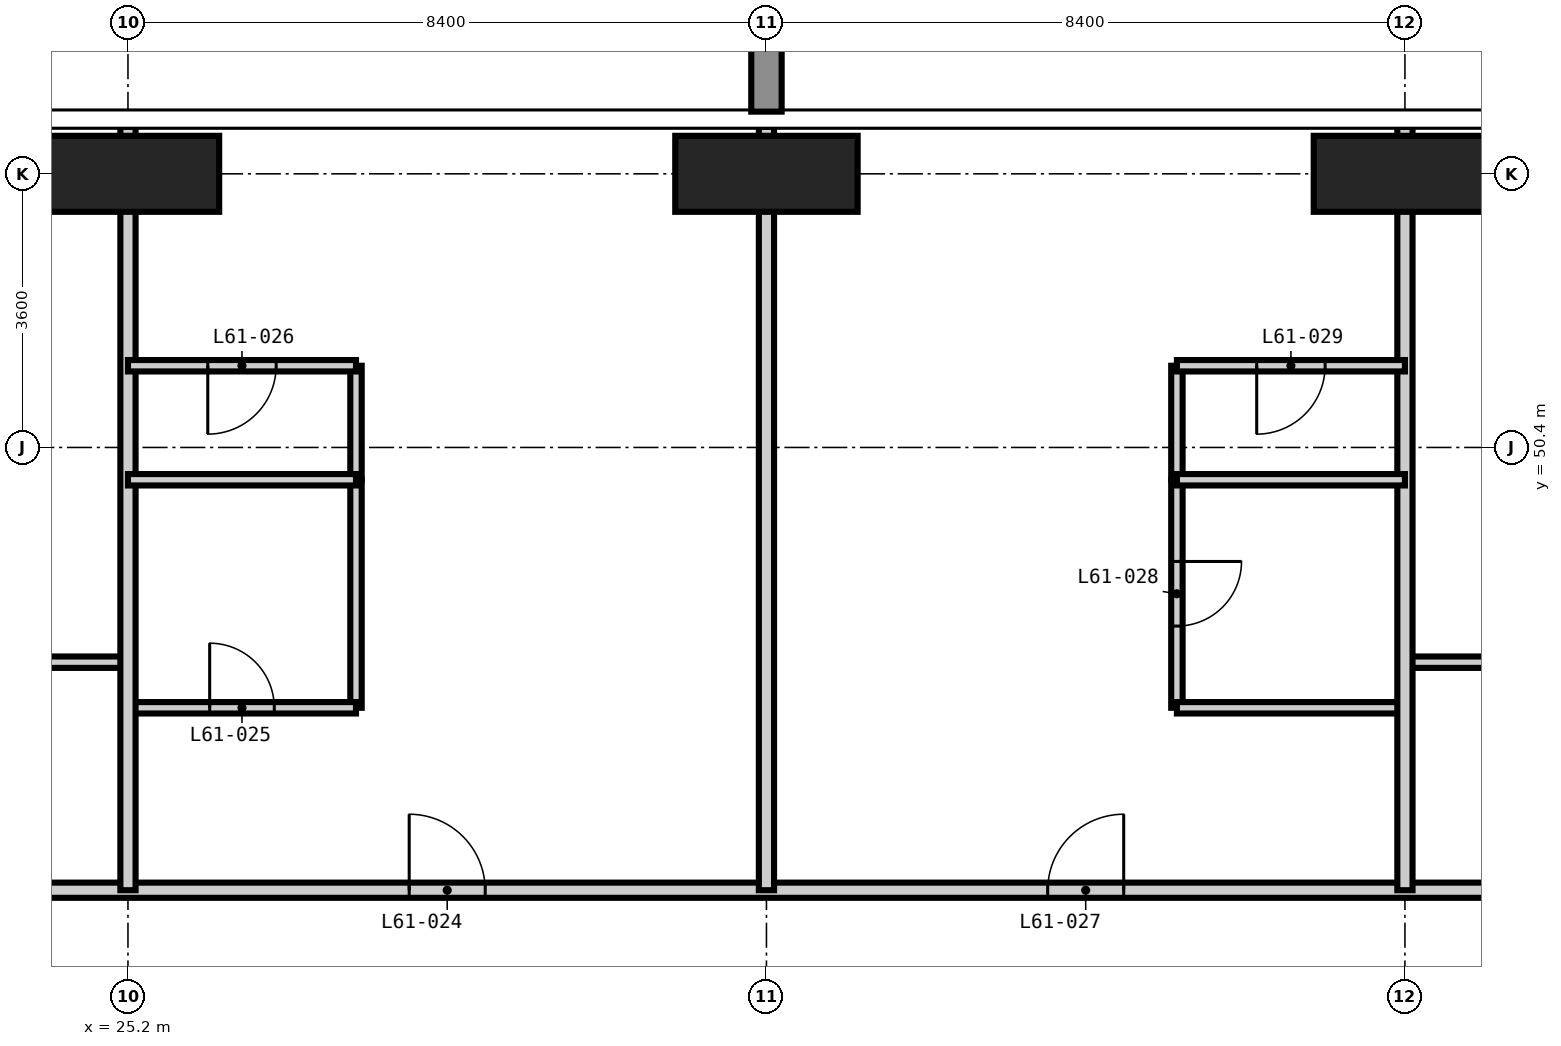
"""IFC4 building model, lengths in metres.
Left out: names, types, materials, properties, quantities, classifications, styles, units other than length and angle.
Written with IfcOpenShell. Run it as: python <this file> out.ifc"""

import sys

from ifc_helpers import new_model, si_unit, direction, frame, frame_2d, origin, origin_2d, place, context, subcontext, project, spatial, rectangle, extrude, element, fill, save


model = new_model("IFC4")
c1 = context("Model", 3, precision=1e-05, world=origin(), true_north=direction((0.0, 1.0)))
c2 = subcontext(c1, "Body", "Model", "MODEL_VIEW")
j1 = project(units=[si_unit("LENGTHUNIT", "METRE"), si_unit("PLANEANGLEUNIT", "RADIAN")], contexts=[c1])
p1 = place(None, origin())
s1 = spatial("IfcSite", under=j1, at=p1, CompositionType="ELEMENT")
p2 = place(p1, origin())
s2 = spatial("IfcBuilding", under=s1, at=p2, CompositionType="ELEMENT")
p3 = place(p2, frame((0.0, 0.0, 237.3)))
s3 = spatial("IfcBuildingStorey", under=s2, at=p3, CompositionType="ELEMENT", Elevation=237.3)
for number, where, z_axis, x_axis in (
    (1, (25.2, 54.0, -0.35), (0.0, 0.0, 1.0), (1.0, 0.0, 0.0)),
    (2, (33.6, 54.0, -0.35), (0.0, 0.0, 1.0), (1.0, 0.0, 0.0)),
    (3, (42.0, 54.0, -0.35), (0.0, 0.0, 1.0), (1.0, 0.0, 0.0)),
):
    element("IfcColumn", number, at=place(p3, frame(where, z_axis=z_axis, x_axis=x_axis)), inside=s3, PredefinedType="COLUMN", context=c2, shape_type="SweptSolid", body=[
        extrude(rectangle(XDim=2.4, YDim=1.0, at=origin_2d()), origin(), (0.0, 0.0, 1.0), 3.9),
    ])
p4 = place(p3, frame((28.2, 46.975, 0.0), z_axis=(0.0, 0.0, 1.0), x_axis=(0.0, 1.0, 0.0)))
e4 = element("IfcWall", 4, at=p4, inside=s3, PredefinedType="PARTITIONING", context=c2, shape_type="SweptSolid", body=[
    extrude(rectangle(XDim=3.0, YDim=0.15, at=frame_2d((1.5, 0.0))), origin(), (0.0, 0.0, 1.0), 3.55),
])
p5 = place(p3, frame((39.0, 46.975, 0.0), z_axis=(0.0, 0.0, 1.0), x_axis=(0.0, 1.0, 0.0)))
e5 = element("IfcWall", 5, at=p5, inside=s3, PredefinedType="PARTITIONING", context=c2, shape_type="SweptSolid", body=[
    extrude(rectangle(XDim=3.0, YDim=0.15, at=frame_2d((1.5, 0.0))), origin(), (0.0, 0.0, 1.0), 3.55),
])
p6 = place(p5, frame((1.075, 0.0, 0.0)))
e6 = element("IfcOpeningElement", 6, at=p6, cuts=e5, PredefinedType="OPENING", context=c2, shape_type="SweptSolid", body=[
    extrude(rectangle(XDim=0.85, YDim=2.1, at=frame_2d((0.425, 1.05))), frame((0.0, 0.085, 0.0), z_axis=(0.0, -1.0, 0.0), x_axis=(1.0, 0.0, 0.0)), (0.0, 0.0, 1.0), 0.17),
])
p7 = place(p3, frame((25.2, 46.975, 0.0), z_axis=(0.0, 0.0, 1.0), x_axis=(1.0, 0.0, 0.0)))
e7 = element("IfcWall", 7, at=p7, inside=s3, PredefinedType="PARTITIONING", context=c2, shape_type="SweptSolid", body=[
    extrude(rectangle(XDim=3.0, YDim=0.15, at=frame_2d((1.5, 0.0))), origin(), (0.0, 0.0, 1.0), 3.55),
])
p8 = place(p7, frame((1.075, 0.0, 0.0)))
e8 = element("IfcOpeningElement", 8, at=p8, cuts=e7, PredefinedType="OPENING", context=c2, shape_type="SweptSolid", body=[
    extrude(rectangle(XDim=0.85, YDim=2.1, at=frame_2d((0.425, 1.05))), frame((0.0, 0.085, 0.0), z_axis=(0.0, -1.0, 0.0), x_axis=(1.0, 0.0, 0.0)), (0.0, 0.0, 1.0), 0.17),
])
p9 = place(p3, frame((39.0, 46.975, 0.0), z_axis=(0.0, 0.0, 1.0), x_axis=(1.0, 0.0, 0.0)))
e9 = element("IfcWall", 9, at=p9, inside=s3, PredefinedType="PARTITIONING", context=c2, shape_type="SweptSolid", body=[
    extrude(rectangle(XDim=3.0, YDim=0.15, at=frame_2d((1.5, 0.0))), origin(), (0.0, 0.0, 1.0), 3.55),
])
p10 = place(p3, frame((22.325, 47.575, 0.0), z_axis=(0.0, 0.0, 1.0), x_axis=(1.0, 0.0, 0.0)))
e10 = element("IfcWall", 10, at=p10, inside=s3, PredefinedType="PARTITIONING", context=c2, shape_type="SweptSolid", body=[
    extrude(rectangle(XDim=2.875, YDim=0.15, at=frame_2d((1.438, 0.0))), origin(), (0.0, 0.0, 1.0), 3.55),
])
p11 = place(p3, frame((42.0, 47.575, 0.0), z_axis=(0.0, 0.0, 1.0), x_axis=(1.0, 0.0, 0.0)))
e11 = element("IfcWall", 11, at=p11, inside=s3, PredefinedType="PARTITIONING", context=c2, shape_type="SweptSolid", body=[
    extrude(rectangle(XDim=3.175, YDim=0.15, at=frame_2d((1.587, 0.0))), origin(), (0.0, 0.0, 1.0), 3.55),
])
p12 = place(p11, frame((1.163, 0.0, 0.0)))
e12 = element("IfcOpeningElement", 12, at=p12, cuts=e11, PredefinedType="OPENING", context=c2, shape_type="SweptSolid", body=[
    extrude(rectangle(XDim=0.85, YDim=2.1, at=frame_2d((0.425, 1.05))), frame((0.0, 0.085, 0.0), z_axis=(0.0, -1.0, 0.0), x_axis=(1.0, 0.0, 0.0)), (0.0, 0.0, 1.0), 0.17),
])
p13 = place(p3, frame((22.325, 44.575, 0.0), z_axis=(0.0, 0.0, 1.0), x_axis=(1.0, 0.0, 0.0)))
e13 = element("IfcWall", 13, at=p13, inside=s3, PredefinedType="PARTITIONING", context=c2, shape_type="SweptSolid", body=[
    extrude(rectangle(XDim=22.85, YDim=0.2, at=frame_2d((11.425, 0.0))), origin(), (0.0, 0.0, 1.0), 3.55),
])
p14 = place(p13, frame((6.575, 0.0, 0.0)))
e14 = element("IfcOpeningElement", 14, at=p14, cuts=e13, PredefinedType="OPENING", context=c2, shape_type="SweptSolid", body=[
    extrude(rectangle(XDim=1.0, YDim=2.2, at=frame_2d((0.5, 1.1))), frame((0.0, 0.11, 0.0), z_axis=(0.0, -1.0, 0.0), x_axis=(1.0, 0.0, 0.0)), (0.0, 0.0, 1.0), 0.22),
])
p15 = place(p13, frame((14.975, 0.0, 0.0)))
e15 = element("IfcOpeningElement", 15, at=p15, cuts=e13, PredefinedType="OPENING", context=c2, shape_type="SweptSolid", body=[
    extrude(rectangle(XDim=1.0, YDim=2.2, at=frame_2d((0.5, 1.1))), frame((0.0, 0.11, 0.0), z_axis=(0.0, -1.0, 0.0), x_axis=(1.0, 0.0, 0.0)), (0.0, 0.0, 1.0), 0.22),
])
for number, where, z_axis, x_axis in (
    (16, (25.2, 44.575, 0.0), (0.0, 0.0, 1.0), (0.0, 1.0, 0.0)),
    (17, (33.6, 44.575, 0.0), (0.0, 0.0, 1.0), (0.0, 1.0, 0.0)),
    (18, (42.0, 44.575, 0.0), (0.0, 0.0, 1.0), (0.0, 1.0, 0.0)),
):
    element("IfcWall", number, at=place(p3, frame(where, z_axis=z_axis, x_axis=x_axis)), inside=s3, PredefinedType="PARTITIONING", context=c2, shape_type="SweptSolid", body=[
        extrude(rectangle(XDim=10.043, YDim=0.2, at=frame_2d((5.021, 0.0))), origin(), (0.0, 0.0, 1.0), 3.55),
    ])
for number, where, z_axis, x_axis in (
    (19, (28.2, 49.975, 0.0), (0.0, 0.0, 1.0), (0.0, 1.0, 0.0)),
    (20, (39.0, 49.975, 0.0), (0.0, 0.0, 1.0), (0.0, 1.0, 0.0)),
):
    element("IfcWall", number, at=place(p3, frame(where, z_axis=z_axis, x_axis=x_axis)), inside=s3, PredefinedType="PARTITIONING", context=c2, shape_type="SweptSolid", body=[
        extrude(rectangle(XDim=1.5, YDim=0.15, at=frame_2d((0.75, 0.0))), origin(), (0.0, 0.0, 1.0), 3.55),
    ])
for number, where, z_axis, x_axis in (
    (21, (25.2, 49.975, 0.0), (0.0, 0.0, 1.0), (1.0, 0.0, 0.0)),
    (22, (39.0, 49.975, 0.0), (0.0, 0.0, 1.0), (1.0, 0.0, 0.0)),
):
    element("IfcWall", number, at=place(p3, frame(where, z_axis=z_axis, x_axis=x_axis)), inside=s3, PredefinedType="PARTITIONING", context=c2, shape_type="SweptSolid", body=[
        extrude(rectangle(XDim=3.0, YDim=0.15, at=frame_2d((1.5, 0.0))), origin(), (0.0, 0.0, 1.0), 3.55),
    ])
p16 = place(p3, frame((25.2, 51.475, 0.0), z_axis=(0.0, 0.0, 1.0), x_axis=(1.0, 0.0, 0.0)))
e23 = element("IfcWall", 23, at=p16, inside=s3, PredefinedType="PARTITIONING", context=c2, shape_type="SweptSolid", body=[
    extrude(rectangle(XDim=3.0, YDim=0.15, at=frame_2d((1.5, 0.0))), origin(), (0.0, 0.0, 1.0), 3.55),
])
p17 = place(p16, frame((1.05, 0.0, 0.0)))
e24 = element("IfcOpeningElement", 24, at=p17, cuts=e23, PredefinedType="OPENING", context=c2, shape_type="SweptSolid", body=[
    extrude(rectangle(XDim=0.9, YDim=2.1, at=frame_2d((0.45, 1.05))), frame((0.0, 0.085, 0.0), z_axis=(0.0, -1.0, 0.0), x_axis=(1.0, 0.0, 0.0)), (0.0, 0.0, 1.0), 0.17),
])
p18 = place(p3, frame((39.0, 51.475, 0.0), z_axis=(0.0, 0.0, 1.0), x_axis=(1.0, 0.0, 0.0)))
e25 = element("IfcWall", 25, at=p18, inside=s3, PredefinedType="PARTITIONING", context=c2, shape_type="SweptSolid", body=[
    extrude(rectangle(XDim=3.0, YDim=0.15, at=frame_2d((1.5, 0.0))), origin(), (0.0, 0.0, 1.0), 3.55),
])
p19 = place(p18, frame((1.05, 0.0, 0.0)))
e26 = element("IfcOpeningElement", 26, at=p19, cuts=e25, PredefinedType="OPENING", context=c2, shape_type="SweptSolid", body=[
    extrude(rectangle(XDim=0.9, YDim=2.1, at=frame_2d((0.45, 1.05))), frame((0.0, 0.085, 0.0), z_axis=(0.0, -1.0, 0.0), x_axis=(1.0, 0.0, 0.0)), (0.0, 0.0, 1.0), 0.17),
])
p20 = place(p14, origin())
e27 = element("IfcDoor", 27, at=p20, inside=s3, OperationType="SINGLE_SWING_LEFT", PredefinedType="DOOR", context=c2, shape_type="SweptSolid", body=[
    extrude(rectangle(XDim=1.0, YDim=2.2, at=frame_2d((0.5, 1.1))), frame((0.0, 0.025, 0.0), z_axis=(0.0, -1.0, 0.0), x_axis=(1.0, 0.0, 0.0)), (0.0, 0.0, 1.0), 0.05),
])
fill(e14, e27)
p21 = place(p8, origin())
e28 = element("IfcDoor", 28, at=p21, inside=s3, OperationType="SINGLE_SWING_LEFT", PredefinedType="DOOR", context=c2, shape_type="SweptSolid", body=[
    extrude(rectangle(XDim=0.85, YDim=2.1, at=frame_2d((0.425, 1.05))), frame((0.0, 0.025, 0.0), z_axis=(0.0, -1.0, 0.0), x_axis=(1.0, 0.0, 0.0)), (0.0, 0.0, 1.0), 0.05),
])
fill(e8, e28)
p22 = place(p17, frame((0.9, 0.0, 0.0), z_axis=(0.0, 0.0, 1.0), x_axis=(-1.0, 0.0, 0.0)))
e29 = element("IfcDoor", 29, at=p22, inside=s3, OperationType="SINGLE_SWING_RIGHT", PredefinedType="DOOR", context=c2, shape_type="SweptSolid", body=[
    extrude(rectangle(XDim=0.9, YDim=2.1, at=frame_2d((0.45, 1.05))), frame((0.0, 0.025, 0.0), z_axis=(0.0, -1.0, 0.0), x_axis=(1.0, 0.0, 0.0)), (0.0, 0.0, 1.0), 0.05),
])
fill(e24, e29)
p23 = place(p15, origin())
e30 = element("IfcDoor", 30, at=p23, inside=s3, OperationType="SINGLE_SWING_RIGHT", PredefinedType="DOOR", context=c2, shape_type="SweptSolid", body=[
    extrude(rectangle(XDim=1.0, YDim=2.2, at=frame_2d((0.5, 1.1))), frame((0.0, 0.025, 0.0), z_axis=(0.0, -1.0, 0.0), x_axis=(1.0, 0.0, 0.0)), (0.0, 0.0, 1.0), 0.05),
])
fill(e15, e30)
p24 = place(p6, frame((0.85, 0.0, 0.0), z_axis=(0.0, 0.0, 1.0), x_axis=(-1.0, 0.0, 0.0)))
e31 = element("IfcDoor", 31, at=p24, inside=s3, OperationType="SINGLE_SWING_LEFT", PredefinedType="DOOR", context=c2, shape_type="SweptSolid", body=[
    extrude(rectangle(XDim=0.85, YDim=2.1, at=frame_2d((0.425, 1.05))), frame((0.0, 0.025, 0.0), z_axis=(0.0, -1.0, 0.0), x_axis=(1.0, 0.0, 0.0)), (0.0, 0.0, 1.0), 0.05),
])
fill(e6, e31)
p25 = place(p19, frame((0.9, 0.0, 0.0), z_axis=(0.0, 0.0, 1.0), x_axis=(-1.0, 0.0, 0.0)))
e32 = element("IfcDoor", 32, at=p25, inside=s3, OperationType="SINGLE_SWING_RIGHT", PredefinedType="DOOR", context=c2, shape_type="SweptSolid", body=[
    extrude(rectangle(XDim=0.9, YDim=2.1, at=frame_2d((0.45, 1.05))), frame((0.0, 0.025, 0.0), z_axis=(0.0, -1.0, 0.0), x_axis=(1.0, 0.0, 0.0)), (0.0, 0.0, 1.0), 0.05),
])
fill(e26, e32)
save(model, sys.argv[1])
